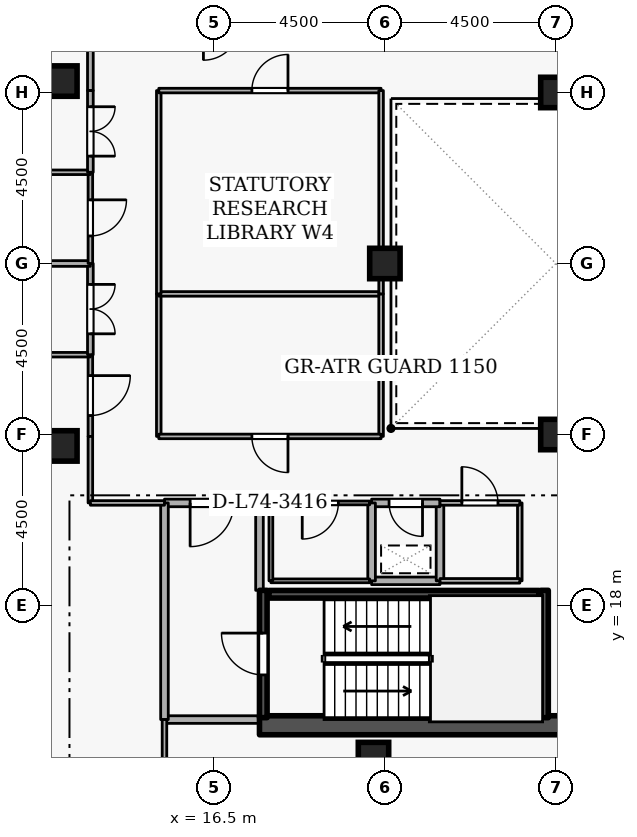
"""IFC4 building model, lengths in metres.
Left out: names, types, materials, properties, quantities, classifications, styles, units other than length and angle.
Written with IfcOpenShell. Run it as: python <this file> out.ifc"""

import sys

from ifc_helpers import new_model, si_unit, direction, frame, frame_2d, origin, origin_2d, place, context, subcontext, project, spatial, rectangle, extrude, element, fill, save


model = new_model("IFC4")
c1 = context("Model", 3, precision=1e-05, world=origin(), true_north=direction((0.0, 1.0)))
c2 = subcontext(c1, "Body", "Model", "MODEL_VIEW")
j1 = project(units=[si_unit("LENGTHUNIT", "METRE"), si_unit("PLANEANGLEUNIT", "RADIAN")], contexts=[c1])
p1 = place(None, origin())
s1 = spatial("IfcSite", under=j1, at=p1, CompositionType="ELEMENT")
p2 = place(p1, origin())
s2 = spatial("IfcBuilding", under=s1, at=p2, CompositionType="ELEMENT")
p3 = place(p2, frame((0.0, 0.0, 276.3)))
s3 = spatial("IfcBuildingStorey", under=s2, at=p3, CompositionType="ELEMENT", Elevation=276.3)
p4 = place(p3, frame((17.7, 14.85, 0.0), z_axis=(0.0, 0.0, 1.0), x_axis=(1.0, 0.0, 0.0)))
e1 = element("IfcWall", 1, at=p4, inside=s3, PredefinedType="SHEAR", context=c2, shape_type="SweptSolid", body=[
    extrude(rectangle(XDim=15.6, YDim=0.5, at=frame_2d((7.8, 0.0))), origin(), (0.0, 0.0, 1.0), 3.6),
])
for number, where, z_axis, x_axis in (
    (2, (12.5, 22.2, 0.0), (0.0, 0.0, 1.0), (1.0, 0.0, 0.0)),
    (3, (12.5, 31.8, 0.0), (0.0, 0.0, 1.0), (1.0, 0.0, 0.0)),
    (4, (20.7, 14.0, 0.0), (0.0, 0.0, 1.0), (1.0, 0.0, 0.0)),
    (5, (25.5, 22.5, 0.0), (0.0, 0.0, 1.0), (1.0, 0.0, 0.0)),
    (6, (25.5, 31.5, 0.0), (0.0, 0.0, 1.0), (1.0, 0.0, 0.0)),
    (7, (21.0, 27.0, 0.0), (0.0, 0.0, 1.0), (1.0, 0.0, 0.0)),
):
    element("IfcColumn", number, at=place(p3, frame(where, z_axis=z_axis, x_axis=x_axis)), inside=s3, PredefinedType="COLUMN", context=c2, shape_type="SweptSolid", body=[
        extrude(rectangle(XDim=0.8, YDim=0.8, at=origin_2d()), origin(), (0.0, 0.0, 1.0), 3.6),
    ])
p5 = place(p3, frame((17.8, 15.05, 0.0), z_axis=(0.0, 0.0, 1.0), x_axis=(0.0, 1.0, 0.0)))
e8 = element("IfcWall", 8, at=p5, inside=s3, PredefinedType="SHEAR", context=c2, shape_type="SweptSolid", body=[
    extrude(rectangle(XDim=3.35, YDim=0.2, at=frame_2d((1.675, 0.0))), origin(), (0.0, 0.0, 1.0), 3.6),
])
p6 = place(p5, frame((1.125, 0.0, 0.0)))
e9 = element("IfcOpeningElement", 9, at=p6, cuts=e8, PredefinedType="OPENING", context=c2, shape_type="SweptSolid", body=[
    extrude(rectangle(XDim=1.1, YDim=2.1, at=frame_2d((0.55, 1.05))), frame((0.0, 0.11, 0.0), z_axis=(0.0, -1.0, 0.0), x_axis=(1.0, 0.0, 0.0)), (0.0, 0.0, 1.0), 0.22),
])
p7 = place(p3, frame((25.2, 18.4, 0.0), z_axis=(0.0, 0.0, 1.0), x_axis=(0.0, -1.0, 0.0)))
e10 = element("IfcWall", 10, at=p7, inside=s3, PredefinedType="SHEAR", context=c2, shape_type="SweptSolid", body=[
    extrude(rectangle(XDim=3.35, YDim=0.2, at=frame_2d((1.675, 0.0))), origin(), (0.0, 0.0, 1.0), 3.6),
])
p8 = place(p3, frame((25.05, 18.297, 0.0), z_axis=(0.0, 0.0, 1.0), x_axis=(-1.0, 0.0, 0.0)))
e11 = element("IfcWall", 11, at=p8, inside=s3, PredefinedType="SHEAR", context=c2, shape_type="SweptSolid", body=[
    extrude(rectangle(XDim=7.1, YDim=0.2, at=frame_2d((3.55, 0.0))), origin(), (0.0, 0.0, 1.0), 3.6),
])
p9 = place(p3, frame((15.2, 15.0, 0.0), z_axis=(0.0, 0.0, 1.0), x_axis=(1.0, 0.0, 0.0)))
e12 = element("IfcWall", 12, at=p9, inside=s3, PredefinedType="STANDARD", context=c2, shape_type="SweptSolid", body=[
    extrude(rectangle(XDim=2.5, YDim=0.2, at=frame_2d((1.25, 0.0))), origin(), (0.0, 0.0, 1.0), 3.26),
])
p10 = place(p3, frame((17.7, 18.4, 0.0), z_axis=(0.0, 0.0, 1.0), x_axis=(0.0, 1.0, 0.0)))
e13 = element("IfcWall", 13, at=p10, inside=s3, PredefinedType="STANDARD", context=c2, shape_type="SweptSolid", body=[
    extrude(rectangle(XDim=2.3, YDim=0.2, at=frame_2d((1.15, 0.0))), origin(), (0.0, 0.0, 1.0), 2.465),
])
p11 = place(p3, frame((17.7, 20.7, 0.0), z_axis=(0.0, 0.0, 1.0), x_axis=(-1.0, 0.0, 0.0)))
e14 = element("IfcWall", 14, at=p11, inside=s3, PredefinedType="STANDARD", context=c2, shape_type="SweptSolid", body=[
    extrude(rectangle(XDim=2.5, YDim=0.2, at=frame_2d((1.25, 0.0))), origin(), (0.0, 0.0, 1.0), 3.26),
])
p12 = place(p11, frame((0.675, 0.0, 0.0)))
e15 = element("IfcOpeningElement", 15, at=p12, cuts=e14, PredefinedType="OPENING", context=c2, shape_type="SweptSolid", body=[
    extrude(rectangle(XDim=1.15, YDim=2.1, at=frame_2d((0.575, 1.05))), frame((0.0, 0.11, 0.0), z_axis=(0.0, -1.0, 0.0), x_axis=(1.0, 0.0, 0.0)), (0.0, 0.0, 1.0), 0.22),
])
p13 = place(p3, frame((15.2, 20.7, 0.0), z_axis=(0.0, 0.0, 1.0), x_axis=(0.0, -1.0, 0.0)))
e16 = element("IfcWall", 16, at=p13, inside=s3, PredefinedType="STANDARD", context=c2, shape_type="SweptSolid", body=[
    extrude(rectangle(XDim=5.7, YDim=0.2, at=frame_2d((2.85, 0.0))), origin(), (0.0, 0.0, 1.0), 3.26),
])
p14 = place(p3, frame((20.65, 18.65, 0.0), z_axis=(0.0, 0.0, 1.0), x_axis=(1.0, 0.0, 0.0)))
e17 = element("IfcWall", 17, at=p14, inside=s3, PredefinedType="STANDARD", context=c2, shape_type="SweptSolid", body=[
    extrude(rectangle(XDim=1.8, YDim=0.2, at=frame_2d((0.9, 0.0))), origin(), (0.0, 0.0, 1.0), 3.26),
])
p15 = place(p3, frame((22.45, 18.65, 0.0), z_axis=(0.0, 0.0, 1.0), x_axis=(0.0, 1.0, 0.0)))
e18 = element("IfcWall", 18, at=p15, inside=s3, PredefinedType="STANDARD", context=c2, shape_type="SweptSolid", body=[
    extrude(rectangle(XDim=2.05, YDim=0.2, at=frame_2d((1.025, 0.0))), origin(), (0.0, 0.0, 1.0), 3.26),
])
p16 = place(p3, frame((22.45, 20.7, 0.0), z_axis=(0.0, 0.0, 1.0), x_axis=(-1.0, 0.0, 0.0)))
e19 = element("IfcWall", 19, at=p16, inside=s3, PredefinedType="STANDARD", context=c2, shape_type="SweptSolid", body=[
    extrude(rectangle(XDim=1.8, YDim=0.2, at=frame_2d((0.9, 0.0))), origin(), (0.0, 0.0, 1.0), 3.26),
])
p17 = place(p16, frame((0.46, 0.0, 0.0)))
e20 = element("IfcOpeningElement", 20, at=p17, cuts=e19, PredefinedType="OPENING", context=c2, shape_type="SweptSolid", body=[
    extrude(rectangle(XDim=0.88, YDim=2.04, at=frame_2d((0.44, 1.02))), frame((0.0, 0.11, 0.0), z_axis=(0.0, -1.0, 0.0), x_axis=(1.0, 0.0, 0.0)), (0.0, 0.0, 1.0), 0.22),
])
p18 = place(p3, frame((20.65, 20.7, 0.0), z_axis=(0.0, 0.0, 1.0), x_axis=(0.0, -1.0, 0.0)))
e21 = element("IfcWall", 21, at=p18, inside=s3, PredefinedType="STANDARD", context=c2, shape_type="SweptSolid", body=[
    extrude(rectangle(XDim=2.05, YDim=0.2, at=frame_2d((1.025, 0.0))), origin(), (0.0, 0.0, 1.0), 3.26),
])
p19 = place(p3, frame((18.0, 18.65, 0.0), z_axis=(0.0, 0.0, 1.0), x_axis=(1.0, 0.0, 0.0)))
e22 = element("IfcWall", 22, at=p19, inside=s3, PredefinedType="PARTITIONING", context=c2, shape_type="SweptSolid", body=[
    extrude(rectangle(XDim=2.6, YDim=0.1, at=frame_2d((1.3, 0.0))), origin(), (0.0, 0.0, 1.0), 3.26),
])
p20 = place(p3, frame((20.6, 20.7, 0.0), z_axis=(0.0, 0.0, 1.0), x_axis=(-1.0, 0.0, 0.0)))
e23 = element("IfcWall", 23, at=p20, inside=s3, PredefinedType="PARTITIONING", context=c2, shape_type="SweptSolid", body=[
    extrude(rectangle(XDim=2.6, YDim=0.1, at=frame_2d((1.3, 0.0))), origin(), (0.0, 0.0, 1.0), 3.26),
])
p21 = place(p20, frame((0.825, 0.0, 0.0)))
e24 = element("IfcOpeningElement", 24, at=p21, cuts=e23, PredefinedType="OPENING", context=c2, shape_type="SweptSolid", body=[
    extrude(rectangle(XDim=0.95, YDim=2.1, at=frame_2d((0.475, 1.05))), frame((0.0, 0.06, 0.0), z_axis=(0.0, -1.0, 0.0), x_axis=(1.0, 0.0, 0.0)), (0.0, 0.0, 1.0), 0.12),
])
p22 = place(p3, frame((18.0, 20.7, 0.0), z_axis=(0.0, 0.0, 1.0), x_axis=(0.0, -1.0, 0.0)))
e25 = element("IfcWall", 25, at=p22, inside=s3, PredefinedType="PARTITIONING", context=c2, shape_type="SweptSolid", body=[
    extrude(rectangle(XDim=2.05, YDim=0.1, at=frame_2d((1.025, 0.0))), origin(), (0.0, 0.0, 1.0), 2.465),
])
p23 = place(p3, frame((24.55, 20.7, 0.0), z_axis=(0.0, 0.0, 1.0), x_axis=(0.0, -1.0, 0.0)))
e26 = element("IfcWall", 26, at=p23, inside=s3, PredefinedType="PARTITIONING", context=c2, shape_type="SweptSolid", body=[
    extrude(rectangle(XDim=2.05, YDim=0.12, at=frame_2d((1.025, 0.0))), origin(), (0.0, 0.0, 1.0), 3.26),
])
p24 = place(p3, frame((24.55, 18.65, 0.0), z_axis=(0.0, 0.0, 1.0), x_axis=(-1.0, 0.0, 0.0)))
e27 = element("IfcWall", 27, at=p24, inside=s3, PredefinedType="PARTITIONING", context=c2, shape_type="SweptSolid", body=[
    extrude(rectangle(XDim=2.1, YDim=0.12, at=frame_2d((1.05, 0.0))), origin(), (0.0, 0.0, 1.0), 3.26),
])
p25 = place(p3, frame((22.45, 20.7, 0.0), z_axis=(0.0, 0.0, 1.0), x_axis=(1.0, 0.0, 0.0)))
e28 = element("IfcWall", 28, at=p25, inside=s3, PredefinedType="PARTITIONING", context=c2, shape_type="SweptSolid", body=[
    extrude(rectangle(XDim=2.1, YDim=0.12, at=frame_2d((1.05, 0.0))), origin(), (0.0, 0.0, 1.0), 3.26),
])
p26 = place(p25, frame((0.575, 0.0, 0.0)))
e29 = element("IfcOpeningElement", 29, at=p26, cuts=e28, PredefinedType="OPENING", context=c2, shape_type="SweptSolid", body=[
    extrude(rectangle(XDim=0.95, YDim=2.1, at=frame_2d((0.475, 1.05))), frame((0.0, 0.07, 0.0), z_axis=(0.0, -1.0, 0.0), x_axis=(1.0, 0.0, 0.0)), (0.0, 0.0, 1.0), 0.14),
])
p27 = place(p3, frame((13.25, 24.6, 0.0), z_axis=(0.0, 0.0, 1.0), x_axis=(0.0, -1.0, 0.0)))
e30 = element("IfcWall", 30, at=p27, inside=s3, PredefinedType="PARTITIONING", context=c2, shape_type="SweptSolid", body=[
    extrude(rectangle(XDim=2.15, YDim=0.12, at=frame_2d((1.075, 0.0))), origin(), (0.0, 0.0, 1.0), 3.26),
])
p28 = place(p27, frame((0.55, 0.0, 0.0)))
e31 = element("IfcOpeningElement", 31, at=p28, cuts=e30, PredefinedType="OPENING", context=c2, shape_type="SweptSolid", body=[
    extrude(rectangle(XDim=1.05, YDim=2.1, at=frame_2d((0.525, 1.05))), frame((0.0, 0.07, 0.0), z_axis=(0.0, -1.0, 0.0), x_axis=(1.0, 0.0, 0.0)), (0.0, 0.0, 1.0), 0.14),
])
p29 = place(p3, frame((13.25, 22.45, 0.0), z_axis=(0.0, 0.0, 1.0), x_axis=(0.0, -1.0, 0.0)))
e32 = element("IfcWall", 32, at=p29, inside=s3, PredefinedType="PARTITIONING", context=c2, shape_type="SweptSolid", body=[
    extrude(rectangle(XDim=1.75, YDim=0.12, at=frame_2d((0.875, 0.0))), origin(), (0.0, 0.0, 1.0), 3.26),
])
p30 = place(p3, frame((13.25, 20.7, 0.0), z_axis=(0.0, 0.0, 1.0), x_axis=(1.0, 0.0, 0.0)))
e33 = element("IfcWall", 33, at=p30, inside=s3, PredefinedType="PARTITIONING", context=c2, shape_type="SweptSolid", body=[
    extrude(rectangle(XDim=1.95, YDim=0.12, at=frame_2d((0.975, 0.0))), origin(), (0.0, 0.0, 1.0), 3.26),
])
p31 = place(p3, frame((15.2, 15.0, 0.0), z_axis=(0.0, 0.0, 1.0), x_axis=(0.0, -1.0, 0.0)))
e34 = element("IfcWall", 34, at=p31, inside=s3, PredefinedType="PARTITIONING", context=c2, shape_type="SweptSolid", body=[
    extrude(rectangle(XDim=11.72, YDim=0.12, at=frame_2d((5.86, 0.0))), origin(), (0.0, 0.0, 1.0), 3.26),
])
p32 = place(p3, frame((7.78, 24.6, 0.0), z_axis=(0.0, 0.0, 1.0), x_axis=(1.0, 0.0, 0.0)))
e35 = element("IfcWall", 35, at=p32, inside=s3, PredefinedType="PARTITIONING", context=c2, shape_type="SweptSolid", body=[
    extrude(rectangle(XDim=5.47, YDim=0.12, at=frame_2d((2.735, 0.0))), origin(), (0.0, 0.0, 1.0), 3.26),
])
p33 = place(p3, frame((13.25, 27.0, 0.0), z_axis=(0.0, 0.0, 1.0), x_axis=(0.0, -1.0, 0.0)))
e36 = element("IfcWall", 36, at=p33, inside=s3, PredefinedType="PARTITIONING", context=c2, shape_type="SweptSolid", body=[
    extrude(rectangle(XDim=2.4, YDim=0.15, at=frame_2d((1.2, 0.0))), origin(), (0.0, 0.0, 1.0), 3.26),
])
p34 = place(p33, frame((0.55, 0.0, 0.0)))
e37 = element("IfcOpeningElement", 37, at=p34, cuts=e36, PredefinedType="OPENING", context=c2, shape_type="SweptSolid", body=[
    extrude(rectangle(XDim=1.3, YDim=2.12, at=frame_2d((0.65, 1.06))), frame((0.0, 0.085, 0.0), z_axis=(0.0, -1.0, 0.0), x_axis=(1.0, 0.0, 0.0)), (0.0, 0.0, 1.0), 0.17),
])
p35 = place(p3, frame((7.78, 27.0, 0.0), z_axis=(0.0, 0.0, 1.0), x_axis=(1.0, 0.0, 0.0)))
e38 = element("IfcWall", 38, at=p35, inside=s3, PredefinedType="PARTITIONING", context=c2, shape_type="SweptSolid", body=[
    extrude(rectangle(XDim=5.47, YDim=0.15, at=frame_2d((2.735, 0.0))), origin(), (0.0, 0.0, 1.0), 2.802),
])
p36 = place(p3, frame((13.25, 29.4, 0.0), z_axis=(0.0, 0.0, 1.0), x_axis=(0.0, -1.0, 0.0)))
e39 = element("IfcWall", 39, at=p36, inside=s3, PredefinedType="PARTITIONING", context=c2, shape_type="SweptSolid", body=[
    extrude(rectangle(XDim=2.4, YDim=0.12, at=frame_2d((1.2, 0.0))), origin(), (0.0, 0.0, 1.0), 3.26),
])
p37 = place(p36, frame((0.725, 0.0, 0.0)))
e40 = element("IfcOpeningElement", 40, at=p37, cuts=e39, PredefinedType="OPENING", context=c2, shape_type="SweptSolid", body=[
    extrude(rectangle(XDim=0.95, YDim=2.1, at=frame_2d((0.475, 1.05))), frame((0.0, 0.07, 0.0), z_axis=(0.0, -1.0, 0.0), x_axis=(1.0, 0.0, 0.0)), (0.0, 0.0, 1.0), 0.14),
])
p38 = place(p3, frame((7.78, 29.4, 0.0), z_axis=(0.0, 0.0, 1.0), x_axis=(1.0, 0.0, 0.0)))
e41 = element("IfcWall", 41, at=p38, inside=s3, PredefinedType="PARTITIONING", context=c2, shape_type="SweptSolid", body=[
    extrude(rectangle(XDim=5.47, YDim=0.12, at=frame_2d((2.735, 0.0))), origin(), (0.0, 0.0, 1.0), 3.26),
])
p39 = place(p3, frame((13.25, 33.3, 0.0), z_axis=(0.0, 0.0, 1.0), x_axis=(0.0, -1.0, 0.0)))
e42 = element("IfcWall", 42, at=p39, inside=s3, PredefinedType="PARTITIONING", context=c2, shape_type="SweptSolid", body=[
    extrude(rectangle(XDim=1.75, YDim=0.15, at=frame_2d((0.875, 0.0))), origin(), (0.0, 0.0, 1.0), 3.26),
])
p40 = place(p3, frame((13.25, 31.55, 0.0), z_axis=(0.0, 0.0, 1.0), x_axis=(0.0, -1.0, 0.0)))
e43 = element("IfcWall", 43, at=p40, inside=s3, PredefinedType="PARTITIONING", context=c2, shape_type="SweptSolid", body=[
    extrude(rectangle(XDim=2.15, YDim=0.15, at=frame_2d((1.075, 0.0))), origin(), (0.0, 0.0, 1.0), 3.26),
])
p41 = place(p40, frame((0.425, 0.0, 0.0)))
e44 = element("IfcOpeningElement", 44, at=p41, cuts=e43, PredefinedType="OPENING", context=c2, shape_type="SweptSolid", body=[
    extrude(rectangle(XDim=1.3, YDim=2.12, at=frame_2d((0.65, 1.06))), frame((0.0, 0.085, 0.0), z_axis=(0.0, -1.0, 0.0), x_axis=(1.0, 0.0, 0.0)), (0.0, 0.0, 1.0), 0.17),
])
p42 = place(p3, frame((15.05, 22.45, 0.0), z_axis=(0.0, 0.0, 1.0), x_axis=(0.0, 1.0, 0.0)))
e45 = element("IfcWall", 45, at=p42, inside=s3, PredefinedType="PARTITIONING", context=c2, shape_type="SweptSolid", body=[
    extrude(rectangle(XDim=3.75, YDim=0.12, at=frame_2d((1.875, 0.0))), origin(), (0.0, 0.0, 1.0), 3.26),
])
p43 = place(p3, frame((15.05, 26.2, 0.0), z_axis=(0.0, 0.0, 1.0), x_axis=(1.0, 0.0, 0.0)))
e46 = element("IfcWall", 46, at=p43, inside=s3, PredefinedType="PARTITIONING", context=c2, shape_type="SweptSolid", body=[
    extrude(rectangle(XDim=5.85, YDim=0.12, at=frame_2d((2.925, 0.0))), origin(), (0.0, 0.0, 1.0), 3.26),
])
p44 = place(p3, frame((20.9, 26.2, 0.0), z_axis=(0.0, 0.0, 1.0), x_axis=(0.0, -1.0, 0.0)))
e47 = element("IfcWall", 47, at=p44, inside=s3, PredefinedType="PARTITIONING", context=c2, shape_type="SweptSolid", body=[
    extrude(rectangle(XDim=3.75, YDim=0.12, at=frame_2d((1.875, 0.0))), origin(), (0.0, 0.0, 1.0), 3.26),
])
p45 = place(p3, frame((20.9, 22.45, 0.0), z_axis=(0.0, 0.0, 1.0), x_axis=(-1.0, 0.0, 0.0)))
e48 = element("IfcWall", 48, at=p45, inside=s3, PredefinedType="PARTITIONING", context=c2, shape_type="SweptSolid", body=[
    extrude(rectangle(XDim=5.85, YDim=0.12, at=frame_2d((2.925, 0.0))), origin(), (0.0, 0.0, 1.0), 3.26),
])
p46 = place(p45, frame((2.45, 0.0, 0.0)))
e49 = element("IfcOpeningElement", 49, at=p46, cuts=e48, PredefinedType="OPENING", context=c2, shape_type="SweptSolid", body=[
    extrude(rectangle(XDim=0.95, YDim=2.1, at=frame_2d((0.475, 1.05))), frame((0.0, 0.07, 0.0), z_axis=(0.0, -1.0, 0.0), x_axis=(1.0, 0.0, 0.0)), (0.0, 0.0, 1.0), 0.14),
])
p47 = place(p3, frame((15.05, 26.2, 0.0), z_axis=(0.0, 0.0, 1.0), x_axis=(0.0, 1.0, 0.0)))
e50 = element("IfcWall", 50, at=p47, inside=s3, PredefinedType="PARTITIONING", context=c2, shape_type="SweptSolid", body=[
    extrude(rectangle(XDim=5.35, YDim=0.12, at=frame_2d((2.675, 0.0))), origin(), (0.0, 0.0, 1.0), 3.26),
])
p48 = place(p3, frame((15.05, 31.55, 0.0), z_axis=(0.0, 0.0, 1.0), x_axis=(1.0, 0.0, 0.0)))
e51 = element("IfcWall", 51, at=p48, inside=s3, PredefinedType="PARTITIONING", context=c2, shape_type="SweptSolid", body=[
    extrude(rectangle(XDim=5.85, YDim=0.12, at=frame_2d((2.925, 0.0))), origin(), (0.0, 0.0, 1.0), 3.26),
])
p49 = place(p48, frame((2.45, 0.0, 0.0)))
e52 = element("IfcOpeningElement", 52, at=p49, cuts=e51, PredefinedType="OPENING", context=c2, shape_type="SweptSolid", body=[
    extrude(rectangle(XDim=0.95, YDim=2.1, at=frame_2d((0.475, 1.05))), frame((0.0, 0.07, 0.0), z_axis=(0.0, -1.0, 0.0), x_axis=(1.0, 0.0, 0.0)), (0.0, 0.0, 1.0), 0.14),
])
p50 = place(p3, frame((20.9, 31.55, 0.0), z_axis=(0.0, 0.0, 1.0), x_axis=(0.0, -1.0, 0.0)))
e53 = element("IfcWall", 53, at=p50, inside=s3, PredefinedType="PARTITIONING", context=c2, shape_type="SweptSolid", body=[
    extrude(rectangle(XDim=5.35, YDim=0.12, at=frame_2d((2.675, 0.0))), origin(), (0.0, 0.0, 1.0), 3.26),
])
p51 = place(p6, origin())
e54 = element("IfcDoor", 54, at=p51, inside=s3, OperationType="SINGLE_SWING_RIGHT", PredefinedType="DOOR", context=c2, shape_type="SweptSolid", body=[
    extrude(rectangle(XDim=1.1, YDim=2.1, at=frame_2d((0.55, 1.05))), frame((0.0, 0.025, 0.0), z_axis=(0.0, -1.0, 0.0), x_axis=(1.0, 0.0, 0.0)), (0.0, 0.0, 1.0), 0.05),
])
fill(e9, e54)
p52 = place(p12, origin())
e55 = element("IfcDoor", 55, at=p52, inside=s3, OperationType="SINGLE_SWING_RIGHT", PredefinedType="DOOR", context=c2, shape_type="SweptSolid", body=[
    extrude(rectangle(XDim=1.15, YDim=2.1, at=frame_2d((0.575, 1.05))), frame((0.0, 0.025, 0.0), z_axis=(0.0, -1.0, 0.0), x_axis=(1.0, 0.0, 0.0)), (0.0, 0.0, 1.0), 0.05),
])
fill(e15, e55)
p53 = place(p17, origin())
e56 = element("IfcDoor", 56, at=p53, inside=s3, OperationType="SINGLE_SWING_LEFT", PredefinedType="DOOR", context=c2, shape_type="SweptSolid", body=[
    extrude(rectangle(XDim=0.88, YDim=2.04, at=frame_2d((0.44, 1.02))), frame((0.0, 0.025, 0.0), z_axis=(0.0, -1.0, 0.0), x_axis=(1.0, 0.0, 0.0)), (0.0, 0.0, 1.0), 0.05),
])
fill(e20, e56)
p54 = place(p21, origin())
e57 = element("IfcDoor", 57, at=p54, inside=s3, OperationType="SINGLE_SWING_RIGHT", PredefinedType="DOOR", context=c2, shape_type="SweptSolid", body=[
    extrude(rectangle(XDim=0.95, YDim=2.1, at=frame_2d((0.475, 1.05))), frame((0.0, 0.025, 0.0), z_axis=(0.0, -1.0, 0.0), x_axis=(1.0, 0.0, 0.0)), (0.0, 0.0, 1.0), 0.05),
])
fill(e24, e57)
p55 = place(p26, origin())
e58 = element("IfcDoor", 58, at=p55, inside=s3, OperationType="SINGLE_SWING_LEFT", PredefinedType="DOOR", context=c2, shape_type="SweptSolid", body=[
    extrude(rectangle(XDim=0.95, YDim=2.1, at=frame_2d((0.475, 1.05))), frame((0.0, 0.025, 0.0), z_axis=(0.0, -1.0, 0.0), x_axis=(1.0, 0.0, 0.0)), (0.0, 0.0, 1.0), 0.05),
])
fill(e29, e58)
p56 = place(p28, origin())
e59 = element("IfcDoor", 59, at=p56, inside=s3, OperationType="SINGLE_SWING_LEFT", PredefinedType="DOOR", context=c2, shape_type="SweptSolid", body=[
    extrude(rectangle(XDim=1.05, YDim=2.1, at=frame_2d((0.525, 1.05))), frame((0.0, 0.025, 0.0), z_axis=(0.0, -1.0, 0.0), x_axis=(1.0, 0.0, 0.0)), (0.0, 0.0, 1.0), 0.05),
])
fill(e31, e59)
p57 = place(p34, origin())
e60 = element("IfcDoor", 60, at=p57, inside=s3, OperationType="DOUBLE_DOOR_SINGLE_SWING", PredefinedType="DOOR", context=c2, shape_type="SweptSolid", body=[
    extrude(rectangle(XDim=1.3, YDim=2.12, at=frame_2d((0.65, 1.06))), frame((0.0, 0.025, 0.0), z_axis=(0.0, -1.0, 0.0), x_axis=(1.0, 0.0, 0.0)), (0.0, 0.0, 1.0), 0.05),
])
fill(e37, e60)
p58 = place(p37, origin())
e61 = element("IfcDoor", 61, at=p58, inside=s3, OperationType="SINGLE_SWING_LEFT", PredefinedType="DOOR", context=c2, shape_type="SweptSolid", body=[
    extrude(rectangle(XDim=0.95, YDim=2.1, at=frame_2d((0.475, 1.05))), frame((0.0, 0.025, 0.0), z_axis=(0.0, -1.0, 0.0), x_axis=(1.0, 0.0, 0.0)), (0.0, 0.0, 1.0), 0.05),
])
fill(e40, e61)
p59 = place(p41, origin())
e62 = element("IfcDoor", 62, at=p59, inside=s3, OperationType="DOUBLE_DOOR_SINGLE_SWING", PredefinedType="DOOR", context=c2, shape_type="SweptSolid", body=[
    extrude(rectangle(XDim=1.3, YDim=2.12, at=frame_2d((0.65, 1.06))), frame((0.0, 0.025, 0.0), z_axis=(0.0, -1.0, 0.0), x_axis=(1.0, 0.0, 0.0)), (0.0, 0.0, 1.0), 0.05),
])
fill(e44, e62)
p60 = place(p46, origin())
e63 = element("IfcDoor", 63, at=p60, inside=s3, OperationType="SINGLE_SWING_LEFT", PredefinedType="DOOR", context=c2, shape_type="SweptSolid", body=[
    extrude(rectangle(XDim=0.95, YDim=2.1, at=frame_2d((0.475, 1.05))), frame((0.0, 0.025, 0.0), z_axis=(0.0, -1.0, 0.0), x_axis=(1.0, 0.0, 0.0)), (0.0, 0.0, 1.0), 0.05),
])
fill(e49, e63)
p61 = place(p49, origin())
e64 = element("IfcDoor", 64, at=p61, inside=s3, OperationType="SINGLE_SWING_RIGHT", PredefinedType="DOOR", context=c2, shape_type="SweptSolid", body=[
    extrude(rectangle(XDim=0.95, YDim=2.1, at=frame_2d((0.475, 1.05))), frame((0.0, 0.025, 0.0), z_axis=(0.0, -1.0, 0.0), x_axis=(1.0, 0.0, 0.0)), (0.0, 0.0, 1.0), 0.05),
])
fill(e52, e64)
save(model, sys.argv[1])
